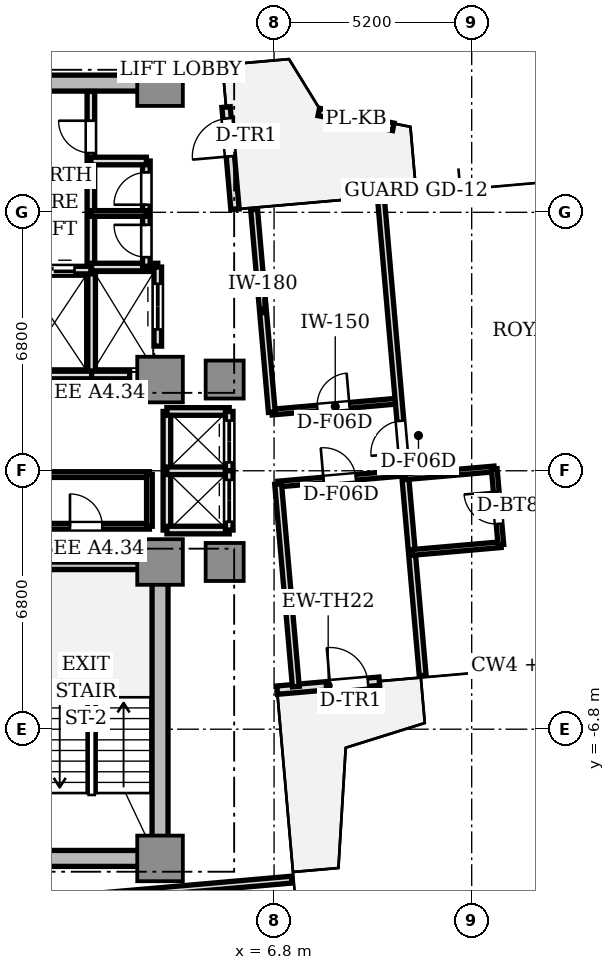
"""IFC4 building model, lengths in metres.
Left out: names, types, materials, properties, quantities, classifications, styles, units other than length and angle.
Written with IfcOpenShell. Run it as: python <this file> out.ifc"""

import sys

from ifc_helpers import new_model, si_unit, direction, frame, frame_2d, origin, origin_2d, place, context, subcontext, project, spatial, rectangle, extrude, source, transform, mapped, element, fill, save


model = new_model("IFC4")
c1 = context("Model", 3, precision=1e-05, world=origin(), true_north=direction((0.0, 1.0)))
c2 = subcontext(c1, "Body", "Model", "MODEL_VIEW")
j1 = project(units=[si_unit("LENGTHUNIT", "METRE"), si_unit("PLANEANGLEUNIT", "RADIAN")], contexts=[c1])
p1 = place(None, origin())
s1 = spatial("IfcSite", under=j1, at=p1, CompositionType="ELEMENT")
p2 = place(p1, origin())
s2 = spatial("IfcBuilding", under=s1, at=p2, CompositionType="ELEMENT")
p3 = place(p2, frame((0.0, 0.0, 195.3)))
s3 = spatial("IfcBuildingStorey", under=s2, at=p3, CompositionType="ELEMENT", Elevation=195.3)
for number, where, z_axis, x_axis in (
    (1, (-3.55, 10.2, 0.0), (0.0, 0.0, 1.0), (1.0, 0.0, 0.0)),
    (2, (-3.55, -10.2, 0.0), (0.0, 0.0, 1.0), (1.0, 0.0, 0.0)),
):
    element("IfcWall", number, at=place(p3, frame(where, z_axis=z_axis, x_axis=x_axis)), inside=s3, PredefinedType="SHEAR", context=c2, shape_type="SweptSolid", body=[
        extrude(rectangle(XDim=7.1, YDim=0.42, at=frame_2d((3.55, 0.0))), origin(), (0.0, 0.0, 1.0), 3.11),
    ])
p4 = place(p3, frame((3.8, -9.75, 0.0), z_axis=(0.0, 0.0, 1.0), x_axis=(0.0, 1.0, 0.0)))
e3 = element("IfcWall", 3, at=p4, inside=s3, PredefinedType="SHEAR", context=c2, shape_type="SweptSolid", body=[
    extrude(rectangle(XDim=6.9, YDim=0.42, at=frame_2d((3.45, 0.0))), origin(), (0.0, 0.0, 1.0), 3.11),
])
m1 = source(origin(), c2, "Body", "SweptSolid", [
    extrude(rectangle(XDim=1.2, YDim=1.2, at=origin_2d()), origin(), (0.0, 0.0, 1.0), 3.11),
])
for number, where, z_axis, x_axis in (
    (4, (3.8, 2.4, 0.0), (0.0, 0.0, 1.0), (1.0, 0.0, 0.0)),
    (5, (3.8, 10.2, 0.0), (0.0, 0.0, 1.0), (1.0, 0.0, 0.0)),
    (6, (3.8, -2.4, 0.0), (0.0, 0.0, 1.0), (1.0, 0.0, 0.0)),
    (7, (3.8, -10.2, 0.0), (0.0, 0.0, 1.0), (1.0, 0.0, 0.0)),
):
    element("IfcColumn", number, at=place(p3, frame(where, z_axis=z_axis, x_axis=x_axis)), inside=s3, PredefinedType="COLUMN", context=c2, shape_type="MappedRepresentation", body=[
        mapped(m1, transform((0.0, 0.0, 0.0), scale=1.0)),
    ])
m2 = source(origin(), c2, "Body", "SweptSolid", [
    extrude(rectangle(XDim=1.0, YDim=1.0, at=origin_2d()), origin(), (0.0, 0.0, 1.0), 3.11),
])
for number, where, z_axis, x_axis in (
    (8, (5.5, 2.4, 0.0), (0.0, 0.0, 1.0), (1.0, 0.0, 0.0)),
    (9, (5.5, -2.4, 0.0), (0.0, 0.0, 1.0), (1.0, 0.0, 0.0)),
):
    element("IfcColumn", number, at=place(p3, frame(where, z_axis=z_axis, x_axis=x_axis)), inside=s3, PredefinedType="COLUMN", context=c2, shape_type="MappedRepresentation", body=[
        mapped(m2, transform((0.0, 0.0, 0.0), scale=1.0)),
    ])
p5 = place(p3, frame((6.879, -5.772, 0.0), z_axis=(0.0, 0.0, 1.0), x_axis=(0.996193619346, 0.087168071984, 0.0)))
e10 = element("IfcWall", 10, at=p5, inside=s3, PredefinedType="STANDARD", context=c2, shape_type="SweptSolid", body=[
    extrude(rectangle(XDim=2.7, YDim=0.22, at=frame_2d((1.35, 0.0))), origin(), (0.0, 0.0, 1.0), 3.11),
])
p6 = place(p5, frame((1.4, 0.0, 0.0)))
e11 = element("IfcOpeningElement", 11, at=p6, cuts=e10, PredefinedType="OPENING", context=c2, shape_type="SweptSolid", body=[
    extrude(rectangle(XDim=1.0, YDim=2.2, at=frame_2d((0.5, 1.1))), frame((0.0, 0.12, 0.0), z_axis=(0.0, -1.0, 0.0), x_axis=(1.0, 0.0, 0.0)), (0.0, 0.0, 1.0), 0.24),
])
p7 = place(p3, frame((5.772, 6.879, 0.0), z_axis=(0.0, 0.0, 1.0), x_axis=(-0.087168071984, 0.996193619346, 0.0)))
e12 = element("IfcWall", 12, at=p7, inside=s3, PredefinedType="STANDARD", context=c2, shape_type="SweptSolid", body=[
    extrude(rectangle(XDim=2.7, YDim=0.22, at=frame_2d((1.35, 0.0))), origin(), (0.0, 0.0, 1.0), 3.11),
])
p8 = place(p7, frame((1.4, 0.0, 0.0)))
e13 = element("IfcOpeningElement", 13, at=p8, cuts=e12, PredefinedType="OPENING", context=c2, shape_type="SweptSolid", body=[
    extrude(rectangle(XDim=1.0, YDim=2.2, at=frame_2d((0.5, 1.1))), frame((0.0, 0.12, 0.0), z_axis=(0.0, -1.0, 0.0), x_axis=(1.0, 0.0, 0.0)), (0.0, 0.0, 1.0), 0.24),
])
p9 = place(p3, frame((9.938, 9.049, 0.0), z_axis=(0.0, 0.0, 1.0), x_axis=(-0.980636950017, 0.195834553288, 0.0)))
e14 = element("IfcWall", 14, at=p9, inside=s3, PredefinedType="PARAPET", context=c2, shape_type="SweptSolid", body=[
    extrude(rectangle(XDim=2.001, YDim=0.2, at=frame_2d((1.0, 0.0))), origin(), (0.0, 0.0, 1.0), 0.65),
])
p10 = place(p3, frame((0.0, -2.5, 0.0), z_axis=(0.0, 0.0, 1.0), x_axis=(1.0, 0.0, 0.0)))
e15 = element("IfcWall", 15, at=p10, inside=s3, PredefinedType="SOLIDWALL", context=c2, shape_type="SweptSolid", body=[
    extrude(rectangle(XDim=3.72, YDim=0.2, at=frame_2d((1.86, 0.0))), origin(), (0.0, 0.0, 1.0), 3.11),
])
p11 = place(p3, frame((1.98, 5.32, 0.0), z_axis=(0.0, 0.0, 1.0), x_axis=(0.0, 1.0, 0.0)))
e16 = element("IfcWall", 16, at=p11, inside=s3, PredefinedType="SOLIDWALL", context=c2, shape_type="SweptSolid", body=[
    extrude(rectangle(XDim=4.66, YDim=0.2, at=frame_2d((2.33, 0.0))), origin(), (0.0, 0.0, 1.0), 2.66),
])
p12 = place(p11, frame((3.04, 0.0, 0.0)))
e17 = element("IfcOpeningElement", 17, at=p12, cuts=e16, PredefinedType="OPENING", context=c2, shape_type="SweptSolid", body=[
    extrude(rectangle(XDim=0.85, YDim=2.1, at=frame_2d((0.425, 1.05))), frame((0.0, 0.11, 0.0), z_axis=(0.0, -1.0, 0.0), x_axis=(1.0, 0.0, 0.0)), (0.0, 0.0, 1.0), 0.22),
])
p13 = place(p3, frame((2.0, 2.5, 0.0), z_axis=(0.0, 0.0, 1.0), x_axis=(0.0, 1.0, 0.0)))
e18 = element("IfcWall", 18, at=p13, inside=s3, PredefinedType="SOLIDWALL", context=c2, shape_type="SweptSolid", body=[
    extrude(rectangle(XDim=2.78, YDim=0.2, at=frame_2d((1.39, 0.0))), origin(), (0.0, 0.0, 1.0), 2.66),
])
p14 = place(p3, frame((0.05, 2.52, 0.0), z_axis=(0.0, 0.0, 1.0), x_axis=(1.0, 0.0, 0.0)))
e19 = element("IfcWall", 19, at=p14, inside=s3, PredefinedType="SOLIDWALL", context=c2, shape_type="SweptSolid", body=[
    extrude(rectangle(XDim=1.95, YDim=0.2, at=frame_2d((0.975, 0.0))), origin(), (0.0, 0.0, 1.0), 2.66),
])
p15 = place(p3, frame((0.05, 5.28, 0.0), z_axis=(0.0, 0.0, 1.0), x_axis=(1.0, 0.0, 0.0)))
e20 = element("IfcWall", 20, at=p15, inside=s3, PredefinedType="SOLIDWALL", context=c2, shape_type="SweptSolid", body=[
    extrude(rectangle(XDim=1.93, YDim=0.2, at=frame_2d((0.965, 0.0))), origin(), (0.0, 0.0, 1.0), 2.66),
])
p16 = place(p15, frame((0.4, 0.0, 0.0)))
e21 = element("IfcOpeningElement", 21, at=p16, cuts=e20, PredefinedType="OPENING", context=c2, shape_type="SweptSolid", body=[
    extrude(rectangle(XDim=1.1, YDim=2.2, at=frame_2d((0.55, 1.1))), frame((0.0, 0.11, 0.0), z_axis=(0.0, -1.0, 0.0), x_axis=(1.0, 0.0, 0.0)), (0.0, 0.0, 1.0), 0.22),
])
p17 = place(p3, frame((2.0, 2.52, 0.0), z_axis=(0.0, 0.0, 1.0), x_axis=(1.0, 0.0, 0.0)))
e22 = element("IfcWall", 22, at=p17, inside=s3, PredefinedType="SOLIDWALL", context=c2, shape_type="SweptSolid", body=[
    extrude(rectangle(XDim=1.0, YDim=0.2, at=frame_2d((0.5, 0.0))), origin(), (0.0, 0.0, 1.0), 2.66),
])
p18 = place(p3, frame((2.0, 5.36, 0.0), z_axis=(0.0, 0.0, 1.0), x_axis=(1.0, 0.0, 0.0)))
e23 = element("IfcWall", 23, at=p18, inside=s3, PredefinedType="SOLIDWALL", context=c2, shape_type="SweptSolid", body=[
    extrude(rectangle(XDim=1.74, YDim=0.2, at=frame_2d((0.87, 0.0))), origin(), (0.0, 0.0, 1.0), 2.66),
])
p19 = place(p3, frame((3.74, 3.28, 0.0), z_axis=(0.0, 0.0, 1.0), x_axis=(0.0, 1.0, 0.0)))
e24 = element("IfcWall", 24, at=p19, inside=s3, PredefinedType="SOLIDWALL", context=c2, shape_type="SweptSolid", body=[
    extrude(rectangle(XDim=2.08, YDim=0.2, at=frame_2d((1.04, 0.0))), origin(), (0.0, 0.0, 1.0), 2.66),
])
p20 = place(p19, frame((0.44, 0.0, 0.0)))
e25 = element("IfcOpeningElement", 25, at=p20, cuts=e24, PredefinedType="OPENING", context=c2, shape_type="SweptSolid", body=[
    extrude(rectangle(XDim=1.2, YDim=2.2, at=frame_2d((0.6, 1.1))), frame((0.0, 0.11, 0.0), z_axis=(0.0, -1.0, 0.0), x_axis=(1.0, 0.0, 0.0)), (0.0, 0.0, 1.0), 0.22),
])
p21 = place(p3, frame((3.98, -1.56, 0.0), z_axis=(0.0, 0.0, 1.0), x_axis=(0.0, 1.0, 0.0)))
e26 = element("IfcWall", 26, at=p21, inside=s3, PredefinedType="SOLIDWALL", context=c2, shape_type="SweptSolid", body=[
    extrude(rectangle(XDim=3.12, YDim=0.2, at=frame_2d((1.56, 0.0))), origin(), (0.0, 0.0, 1.0), 2.28),
])
for number, where, z_axis, x_axis in (
    (27, (3.98, 1.56, 0.0), (0.0, 0.0, 1.0), (1.0, 0.0, 0.0)),
    (28, (3.98, -1.56, 0.0), (0.0, 0.0, 1.0), (1.0, 0.0, 0.0)),
    (29, (3.98, 0.0, 0.0), (0.0, 0.0, 1.0), (1.0, 0.0, 0.0)),
):
    element("IfcWall", number, at=place(p3, frame(where, z_axis=z_axis, x_axis=x_axis)), inside=s3, PredefinedType="SOLIDWALL", context=c2, shape_type="SweptSolid", body=[
        extrude(rectangle(XDim=1.64, YDim=0.2, at=frame_2d((0.82, 0.0))), origin(), (0.0, 0.0, 1.0), 2.66),
    ])
p22 = place(p3, frame((5.62, 0.0, 0.0), z_axis=(0.0, 0.0, 1.0), x_axis=(0.0, 1.0, 0.0)))
e30 = element("IfcWall", 30, at=p22, inside=s3, PredefinedType="SOLIDWALL", context=c2, shape_type="SweptSolid", body=[
    extrude(rectangle(XDim=1.56, YDim=0.2, at=frame_2d((0.78, 0.0))), origin(), (0.0, 0.0, 1.0), 2.66),
])
p23 = place(p22, frame((0.22, 0.0, 0.0)))
e31 = element("IfcOpeningElement", 31, at=p23, cuts=e30, PredefinedType="OPENING", context=c2, shape_type="SweptSolid", body=[
    extrude(rectangle(XDim=1.1, YDim=2.2, at=frame_2d((0.55, 1.1))), frame((0.0, 0.11, 0.0), z_axis=(0.0, -1.0, 0.0), x_axis=(1.0, 0.0, 0.0)), (0.0, 0.0, 1.0), 0.22),
])
p24 = place(p3, frame((5.62, -1.56, 0.0), z_axis=(0.0, 0.0, 1.0), x_axis=(0.0, 1.0, 0.0)))
e32 = element("IfcWall", 32, at=p24, inside=s3, PredefinedType="SOLIDWALL", context=c2, shape_type="SweptSolid", body=[
    extrude(rectangle(XDim=1.56, YDim=0.2, at=frame_2d((0.78, 0.0))), origin(), (0.0, 0.0, 1.0), 2.66),
])
p25 = place(p24, frame((0.22, 0.0, 0.0)))
e33 = element("IfcOpeningElement", 33, at=p25, cuts=e32, PredefinedType="OPENING", context=c2, shape_type="SweptSolid", body=[
    extrude(rectangle(XDim=1.1, YDim=2.2, at=frame_2d((0.55, 1.1))), frame((0.0, 0.11, 0.0), z_axis=(0.0, -1.0, 0.0), x_axis=(1.0, 0.0, 0.0)), (0.0, 0.0, 1.0), 0.22),
])
p26 = place(p3, frame((3.44, 5.38, 0.0), z_axis=(0.0, 0.0, 1.0), x_axis=(0.0, 1.0, 0.0)))
e34 = element("IfcWall", 34, at=p26, inside=s3, PredefinedType="SOLIDWALL", context=c2, shape_type="SweptSolid", body=[
    extrude(rectangle(XDim=2.77, YDim=0.2, at=frame_2d((1.385, 0.0))), origin(), (0.0, 0.0, 1.0), 2.66),
])
p27 = place(p26, frame((0.24, 0.0, 0.0)))
e35 = element("IfcOpeningElement", 35, at=p27, cuts=e34, PredefinedType="OPENING", context=c2, shape_type="SweptSolid", body=[
    extrude(rectangle(XDim=0.85, YDim=2.1, at=frame_2d((0.425, 1.05))), frame((0.0, 0.11, 0.0), z_axis=(0.0, -1.0, 0.0), x_axis=(1.0, 0.0, 0.0)), (0.0, 0.0, 1.0), 0.22),
])
p28 = place(p26, frame((1.62, 0.0, 0.0)))
e36 = element("IfcOpeningElement", 36, at=p28, cuts=e34, PredefinedType="OPENING", context=c2, shape_type="SweptSolid", body=[
    extrude(rectangle(XDim=0.85, YDim=2.1, at=frame_2d((0.425, 1.05))), frame((0.0, 0.11, 0.0), z_axis=(0.0, -1.0, 0.0), x_axis=(1.0, 0.0, 0.0)), (0.0, 0.0, 1.0), 0.22),
])
p29 = place(p3, frame((1.98, 8.15, 0.0), z_axis=(0.0, 0.0, 1.0), x_axis=(1.0, 0.0, 0.0)))
e37 = element("IfcWall", 37, at=p29, inside=s3, PredefinedType="SOLIDWALL", context=c2, shape_type="SweptSolid", body=[
    extrude(rectangle(XDim=1.46, YDim=0.2, at=frame_2d((0.73, 0.0))), origin(), (0.0, 0.0, 1.0), 2.66),
])
p30 = place(p3, frame((1.98, 6.77, 0.0), z_axis=(0.0, 0.0, 1.0), x_axis=(1.0, 0.0, 0.0)))
e38 = element("IfcWall", 38, at=p30, inside=s3, PredefinedType="PARTITIONING", context=c2, shape_type="SweptSolid", body=[
    extrude(rectangle(XDim=1.46, YDim=0.15, at=frame_2d((0.73, 0.0))), origin(), (0.0, 0.0, 1.0), 2.66),
])
p31 = place(p3, frame((0.38, -0.1, 0.0), z_axis=(0.0, 0.0, 1.0), x_axis=(1.0, 0.0, 0.0)))
e39 = element("IfcWall", 39, at=p31, inside=s3, PredefinedType="PARTITIONING", context=c2, shape_type="SweptSolid", body=[
    extrude(rectangle(XDim=3.14, YDim=0.15, at=frame_2d((1.57, 0.0))), origin(), (0.0, 0.0, 1.0), 2.66),
])
p32 = place(p3, frame((0.38, -1.46, 0.0), z_axis=(0.0, 0.0, 1.0), x_axis=(1.0, 0.0, 0.0)))
e40 = element("IfcWall", 40, at=p32, inside=s3, PredefinedType="PARTITIONING", context=c2, shape_type="SweptSolid", body=[
    extrude(rectangle(XDim=3.14, YDim=0.15, at=frame_2d((1.57, 0.0))), origin(), (0.0, 0.0, 1.0), 2.66),
])
p33 = place(p32, frame((1.05, 0.0, 0.0)))
e41 = element("IfcOpeningElement", 41, at=p33, cuts=e40, PredefinedType="OPENING", context=c2, shape_type="SweptSolid", body=[
    extrude(rectangle(XDim=0.85, YDim=2.1, at=frame_2d((0.425, 1.05))), frame((0.0, 0.085, 0.0), z_axis=(0.0, -1.0, 0.0), x_axis=(1.0, 0.0, 0.0)), (0.0, 0.0, 1.0), 0.17),
])
p34 = place(p3, frame((3.52, -1.46, 0.0), z_axis=(0.0, 0.0, 1.0), x_axis=(0.0, 1.0, 0.0)))
e42 = element("IfcWall", 42, at=p34, inside=s3, PredefinedType="PARTITIONING", context=c2, shape_type="SweptSolid", body=[
    extrude(rectangle(XDim=1.36, YDim=0.15, at=frame_2d((0.68, 0.0))), origin(), (0.0, 0.0, 1.0), 2.28),
])
p35 = place(p3, frame((6.741, 1.543, 0.0), z_axis=(0.0, 0.0, 1.0), x_axis=(0.996193954812, 0.087164238054, 0.0)))
e43 = element("IfcWall", 43, at=p35, inside=s3, PredefinedType="PARTITIONING", context=c2, shape_type="SweptSolid", body=[
    extrude(rectangle(XDim=3.35, YDim=0.15, at=frame_2d((1.675, 0.0))), origin(), (0.0, 0.0, 1.0), 2.66),
])
p36 = place(p35, frame((1.2, 0.0, 0.0)))
e44 = element("IfcOpeningElement", 44, at=p36, cuts=e43, PredefinedType="OPENING", context=c2, shape_type="SweptSolid", body=[
    extrude(rectangle(XDim=0.85, YDim=2.1, at=frame_2d((0.425, 1.05))), frame((0.0, 0.085, 0.0), z_axis=(0.0, -1.0, 0.0), x_axis=(1.0, 0.0, 0.0)), (0.0, 0.0, 1.0), 0.17),
])
p37 = place(p3, frame((6.907, -0.349, 0.0), z_axis=(0.0, 0.0, 1.0), x_axis=(0.996193954812, 0.087164238054, 0.0)))
e45 = element("IfcWall", 45, at=p37, inside=s3, PredefinedType="PARTITIONING", context=c2, shape_type="SweptSolid", body=[
    extrude(rectangle(XDim=3.35, YDim=0.15, at=frame_2d((1.675, 0.0))), origin(), (0.0, 0.0, 1.0), 2.66),
])
p38 = place(p37, frame((1.2, 0.0, 0.0)))
e46 = element("IfcOpeningElement", 46, at=p38, cuts=e45, PredefinedType="OPENING", context=c2, shape_type="SweptSolid", body=[
    extrude(rectangle(XDim=0.85, YDim=2.1, at=frame_2d((0.425, 1.05))), frame((0.0, 0.085, 0.0), z_axis=(0.0, -1.0, 0.0), x_axis=(1.0, 0.0, 0.0)), (0.0, 0.0, 1.0), 0.17),
])
for number, where, z_axis, x_axis in (
    (47, (6.741, 1.543, 0.0), (0.0, 0.0, 1.0), (-0.087, 0.996, 0.0)),
    (48, (7.373, -5.679, 0.0), (0.0, 0.0, 1.0), (-0.087, 0.996, 0.0)),
):
    element("IfcWall", number, at=place(p3, frame(where, z_axis=z_axis, x_axis=x_axis)), inside=s3, PredefinedType="PARTITIONING", context=c2, shape_type="SweptSolid", body=[
        extrude(rectangle(XDim=5.35, YDim=0.18, at=frame_2d((2.675, 0.0))), origin(), (0.0, 0.0, 1.0), 2.66),
    ])
p39 = place(p3, frame((10.71, -5.387, 0.0), z_axis=(0.0, 0.0, 1.0), x_axis=(-0.087154691724, 0.996194790044, 0.0)))
e49 = element("IfcWall", 49, at=p39, inside=s3, PredefinedType="PARTITIONING", context=c2, shape_type="SweptSolid", body=[
    extrude(rectangle(XDim=12.6, YDim=0.18, at=frame_2d((6.3, 0.0))), origin(), (0.0, 0.0, 1.0), 2.66),
])
p40 = place(p39, frame((5.875, 0.0, 0.0)))
e50 = element("IfcOpeningElement", 50, at=p40, cuts=e49, PredefinedType="OPENING", context=c2, shape_type="SweptSolid", body=[
    extrude(rectangle(XDim=0.85, YDim=2.1, at=frame_2d((0.425, 1.05))), frame((0.0, 0.1, 0.0), z_axis=(0.0, -1.0, 0.0), x_axis=(1.0, 0.0, 0.0)), (0.0, 0.0, 1.0), 0.2),
])
for number, where, z_axis, x_axis in (
    (51, (10.253, -0.157, 0.0), (0.0, 0.0, 1.0), (0.996, 0.087, 0.0)),
    (52, (10.427, -2.149, 0.0), (0.0, 0.0, 1.0), (0.996, 0.087, 0.0)),
):
    element("IfcWall", number, at=place(p3, frame(where, z_axis=z_axis, x_axis=x_axis)), inside=s3, PredefinedType="PARTITIONING", context=c2, shape_type="SweptSolid", body=[
        extrude(rectangle(XDim=2.35, YDim=0.15, at=frame_2d((1.175, 0.0))), origin(), (0.0, 0.0, 1.0), 2.66),
    ])
p41 = place(p3, frame((12.768, -1.945, 0.0), z_axis=(0.0, 0.0, 1.0), x_axis=(-0.087156350505, 0.99619464492, 0.0)))
e53 = element("IfcWall", 53, at=p41, inside=s3, PredefinedType="PARTITIONING", context=c2, shape_type="SweptSolid", body=[
    extrude(rectangle(XDim=2.0, YDim=0.15, at=frame_2d((1.0, 0.0))), origin(), (0.0, 0.0, 1.0), 2.66),
])
p42 = place(p41, frame((0.55, 0.0, 0.0)))
e54 = element("IfcOpeningElement", 54, at=p42, cuts=e53, PredefinedType="OPENING", context=c2, shape_type="SweptSolid", body=[
    extrude(rectangle(XDim=0.85, YDim=2.1, at=frame_2d((0.425, 1.05))), frame((0.0, 0.085, 0.0), z_axis=(0.0, -1.0, 0.0), x_axis=(1.0, 0.0, 0.0)), (0.0, 0.0, 1.0), 0.17),
])
p43 = place(p3, frame((5.287, 11.856, 0.0), z_axis=(0.0, 0.0, 1.0), x_axis=(-0.996194790044, -0.087154691724, 0.0)))
e55 = element("IfcWall", 55, at=p43, inside=s3, PredefinedType="PARTITIONING", context=c2, shape_type="SweptSolid", body=[
    extrude(rectangle(XDim=12.6, YDim=0.15, at=frame_2d((6.3, 0.0))), origin(), (0.0, 0.0, 1.0), 2.66),
])
p44 = place(p43, frame((5.5, 0.0, 0.0)))
e56 = element("IfcOpeningElement", 56, at=p44, cuts=e55, PredefinedType="OPENING", context=c2, shape_type="SweptSolid", body=[
    extrude(rectangle(XDim=1.6, YDim=2.25, at=frame_2d((0.8, 1.125))), frame((0.0, 0.085, 0.0), z_axis=(0.0, -1.0, 0.0), x_axis=(1.0, 0.0, 0.0)), (0.0, 0.0, 1.0), 0.17),
])
p45 = place(p3, frame((-3.095, -11.664, 0.0), z_axis=(0.0, 0.0, 1.0), x_axis=(0.996196061386, 0.087140158824, 0.0)))
e57 = element("IfcWall", 57, at=p45, inside=s3, PredefinedType="PARTITIONING", context=c2, shape_type="SweptSolid", body=[
    extrude(rectangle(XDim=10.4, YDim=0.18, at=frame_2d((5.2, 0.0))), origin(), (0.0, 0.0, 1.0), 2.66),
])
m3 = source(origin(), c2, "Body", "SweptSolid", [
    extrude(rectangle(XDim=1.0, YDim=0.05, at=origin_2d()), origin(), (0.0, 0.0, 1.0), 2.2),
])
p46 = place(p6, frame((0.5, 0.0, 0.0)))
e58 = element("IfcDoor", 58, at=p46, inside=s3, OperationType="SINGLE_SWING_LEFT", PredefinedType="DOOR", context=c2, shape_type="MappedRepresentation", body=[
    mapped(m3, transform((0.0, 0.0, 0.0), scale=1.0)),
])
fill(e11, e58)
p47 = place(p8, frame((0.5, 0.0, 0.0)))
e59 = element("IfcDoor", 59, at=p47, inside=s3, OperationType="SINGLE_SWING_LEFT", PredefinedType="DOOR", context=c2, shape_type="MappedRepresentation", body=[
    mapped(m3, transform((0.0, 0.0, 0.0), scale=1.0)),
])
fill(e13, e59)
m4 = source(origin(), c2, "Body", "SweptSolid", [
    extrude(rectangle(XDim=0.85, YDim=0.05, at=origin_2d()), origin(), (0.0, 0.0, 1.0), 2.1),
])
p48 = place(p12, frame((0.425, 0.0, 0.0)))
e60 = element("IfcDoor", 60, at=p48, inside=s3, OperationType="SINGLE_SWING_RIGHT", PredefinedType="DOOR", context=c2, shape_type="MappedRepresentation", body=[
    mapped(m4, transform((0.0, 0.0, 0.0), scale=1.0)),
])
fill(e17, e60)
m5 = source(origin(), c2, "Body", "SweptSolid", [
    extrude(rectangle(XDim=1.1, YDim=0.05, at=origin_2d()), origin(), (0.0, 0.0, 1.0), 2.2),
])
p49 = place(p16, frame((0.55, 0.0, 0.0)))
e61 = element("IfcDoor", 61, at=p49, inside=s3, OperationType="DOUBLE_DOOR_SLIDING", PredefinedType="DOOR", context=c2, shape_type="MappedRepresentation", body=[
    mapped(m5, transform((0.0, 0.0, 0.0), scale=1.0)),
])
fill(e21, e61)
m6 = source(origin(), c2, "Body", "SweptSolid", [
    extrude(rectangle(XDim=1.2, YDim=0.05, at=origin_2d()), origin(), (0.0, 0.0, 1.0), 2.2),
])
p50 = place(p20, frame((0.6, 0.0, 0.0)))
e62 = element("IfcDoor", 62, at=p50, inside=s3, OperationType="DOUBLE_DOOR_SLIDING", PredefinedType="DOOR", context=c2, shape_type="MappedRepresentation", body=[
    mapped(m6, transform((0.0, 0.0, 0.0), scale=1.0)),
])
fill(e25, e62)
p51 = place(p23, frame((0.55, 0.0, 0.0)))
e63 = element("IfcDoor", 63, at=p51, inside=s3, OperationType="DOUBLE_DOOR_SLIDING", PredefinedType="DOOR", context=c2, shape_type="MappedRepresentation", body=[
    mapped(m5, transform((0.0, 0.0, 0.0), scale=1.0)),
])
fill(e31, e63)
p52 = place(p25, frame((0.55, 0.0, 0.0)))
e64 = element("IfcDoor", 64, at=p52, inside=s3, OperationType="DOUBLE_DOOR_SLIDING", PredefinedType="DOOR", context=c2, shape_type="MappedRepresentation", body=[
    mapped(m5, transform((0.0, 0.0, 0.0), scale=1.0)),
])
fill(e33, e64)
p53 = place(p27, frame((0.425, 0.0, 0.0)))
e65 = element("IfcDoor", 65, at=p53, inside=s3, OperationType="SINGLE_SWING_RIGHT", PredefinedType="DOOR", context=c2, shape_type="MappedRepresentation", body=[
    mapped(m4, transform((0.0, 0.0, 0.0), scale=1.0)),
])
fill(e35, e65)
p54 = place(p28, frame((0.425, 0.0, 0.0)))
e66 = element("IfcDoor", 66, at=p54, inside=s3, OperationType="SINGLE_SWING_LEFT", PredefinedType="DOOR", context=c2, shape_type="MappedRepresentation", body=[
    mapped(m4, transform((0.0, 0.0, 0.0), scale=1.0)),
])
fill(e36, e66)
p55 = place(p33, frame((0.425, 0.0, 0.0)))
e67 = element("IfcDoor", 67, at=p55, inside=s3, OperationType="SINGLE_SWING_LEFT", PredefinedType="DOOR", context=c2, shape_type="MappedRepresentation", body=[
    mapped(m4, transform((0.0, 0.0, 0.0), scale=1.0)),
])
fill(e41, e67)
p56 = place(p36, frame((0.425, 0.0, 0.0)))
e68 = element("IfcDoor", 68, at=p56, inside=s3, OperationType="SINGLE_SWING_RIGHT", PredefinedType="DOOR", context=c2, shape_type="MappedRepresentation", body=[
    mapped(m4, transform((0.0, 0.0, 0.0), scale=1.0)),
])
fill(e44, e68)
p57 = place(p38, frame((0.425, 0.0, 0.0)))
e69 = element("IfcDoor", 69, at=p57, inside=s3, OperationType="SINGLE_SWING_LEFT", PredefinedType="DOOR", context=c2, shape_type="MappedRepresentation", body=[
    mapped(m4, transform((0.0, 0.0, 0.0), scale=1.0)),
])
fill(e46, e69)
p58 = place(p42, frame((0.425, 0.0, 0.0)))
e70 = element("IfcDoor", 70, at=p58, inside=s3, OperationType="SINGLE_SWING_RIGHT", PredefinedType="DOOR", context=c2, shape_type="MappedRepresentation", body=[
    mapped(m4, transform((0.0, 0.0, 0.0), scale=1.0)),
])
fill(e54, e70)
p59 = place(p40, frame((0.425, 0.0, 0.0)))
e71 = element("IfcDoor", 71, at=p59, inside=s3, OperationType="SINGLE_SWING_LEFT", PredefinedType="DOOR", context=c2, shape_type="MappedRepresentation", body=[
    mapped(m4, transform((0.0, 0.0, 0.0), scale=1.0)),
])
fill(e50, e71)
save(model, sys.argv[1])
